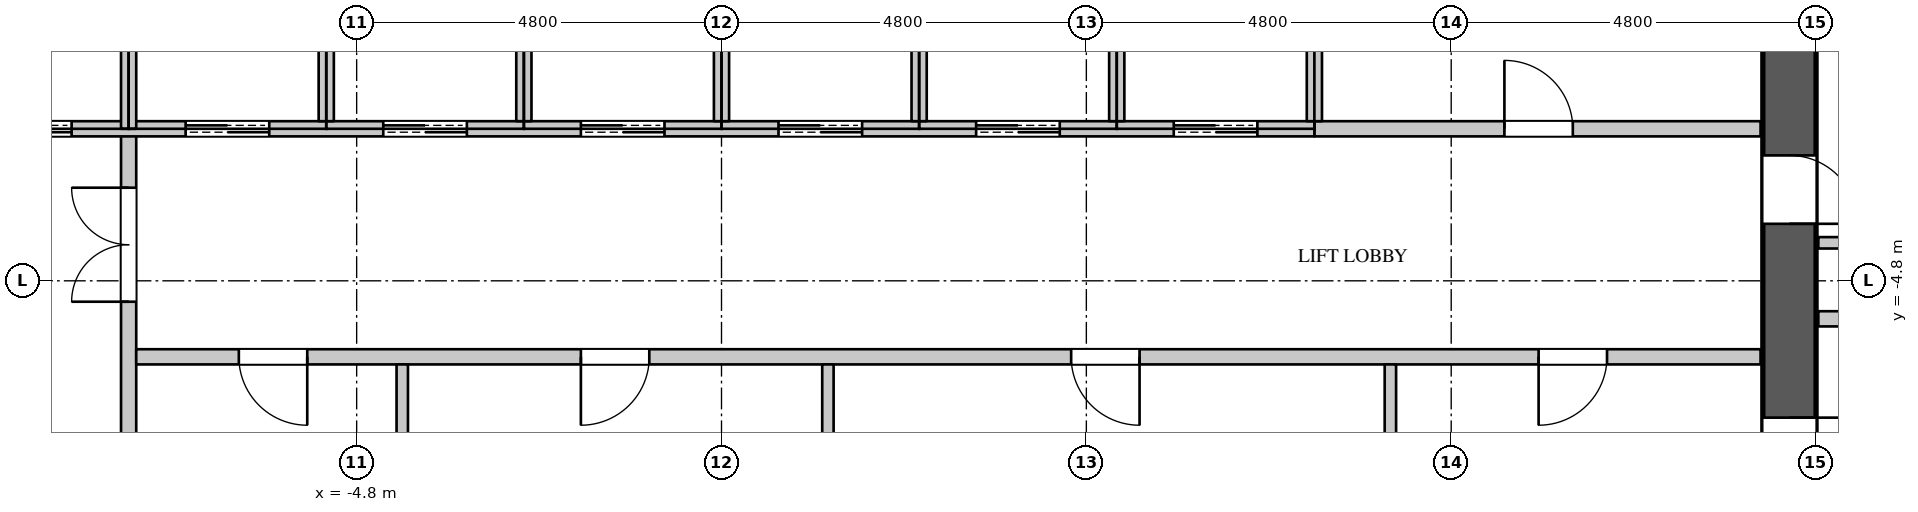
"""IFC4 building model, lengths in metres.
Left out: names, types, materials, properties, quantities, classifications, styles, units other than length and angle.
Written with IfcOpenShell. Run it as: python <this file> out.ifc"""

import sys

from ifc_helpers import new_model, si_unit, direction, frame, frame_2d, origin, place, context, subcontext, project, spatial, rectangle, extrude, element, fill, save


model = new_model("IFC4")
c1 = context("Model", 3, precision=1e-05, world=origin(), true_north=direction((0.0, 1.0)))
c2 = subcontext(c1, "Body", "Model", "MODEL_VIEW")
j1 = project(units=[si_unit("LENGTHUNIT", "METRE"), si_unit("PLANEANGLEUNIT", "RADIAN")], contexts=[c1])
p1 = place(None, origin())
s1 = spatial("IfcSite", under=j1, at=p1, CompositionType="ELEMENT")
p2 = place(p1, origin())
s2 = spatial("IfcBuilding", under=s1, at=p2, CompositionType="ELEMENT")
p3 = place(p2, frame((0.0, 0.0, 208.5)))
s3 = spatial("IfcBuildingStorey", under=s2, at=p3, CompositionType="ELEMENT", Elevation=208.5)
p4 = place(p3, frame((14.05, -11.3, 0.0), z_axis=(0.0, 0.0, 1.0), x_axis=(0.0, 1.0, 0.0)))
e1 = element("IfcWall", 1, at=p4, inside=s3, PredefinedType="SHEAR", context=c2, shape_type="SweptSolid", body=[
    extrude(rectangle(XDim=22.6, YDim=0.7, at=frame_2d((11.3, 0.0))), origin(), (0.0, 0.0, 1.0), 5.4),
])
p5 = place(p4, frame((20.5, 0.0, 0.0)))
e2 = element("IfcOpeningElement", 2, at=p5, cuts=e1, PredefinedType="OPENING", context=c2, shape_type="SweptSolid", body=[
    extrude(rectangle(XDim=1.1, YDim=2.2, at=frame_2d((0.55, 1.1))), frame((0.0, 0.36, 0.0), z_axis=(0.0, -1.0, 0.0), x_axis=(1.0, 0.0, 0.0)), (0.0, 0.0, 1.0), 0.72),
])
p6 = place(p4, frame((7.25, 0.0, 0.0)))
e3 = element("IfcOpeningElement", 3, at=p6, cuts=e1, PredefinedType="OPENING", context=c2, shape_type="SweptSolid", body=[
    extrude(rectangle(XDim=0.9, YDim=2.2, at=frame_2d((0.45, 1.1))), frame((0.0, 0.36, 0.0), z_axis=(0.0, -1.0, 0.0), x_axis=(1.0, 0.0, 0.0)), (0.0, 0.0, 1.0), 0.72),
])
p7 = place(p4, frame((1.0, 0.0, 0.0)))
e4 = element("IfcOpeningElement", 4, at=p7, cuts=e1, PredefinedType="OPENING", context=c2, shape_type="SweptSolid", body=[
    extrude(rectangle(XDim=1.1, YDim=2.2, at=frame_2d((0.55, 1.1))), frame((0.0, 0.36, 0.0), z_axis=(0.0, -1.0, 0.0), x_axis=(1.0, 0.0, 0.0)), (0.0, 0.0, 1.0), 0.72),
])
p8 = place(p4, frame((3.8, 0.0, 0.0)))
e5 = element("IfcOpeningElement", 5, at=p8, cuts=e1, PredefinedType="OPENING", context=c2, shape_type="SweptSolid", body=[
    extrude(rectangle(XDim=0.9, YDim=2.2, at=frame_2d((0.45, 1.1))), frame((0.0, 0.36, 0.0), z_axis=(0.0, -1.0, 0.0), x_axis=(1.0, 0.0, 0.0)), (0.0, 0.0, 1.0), 0.72),
])
p9 = place(p3, frame((-7.8, -8.075, 0.0), z_axis=(0.0, 0.0, 1.0), x_axis=(0.0, 1.0, 0.0)))
e6 = element("IfcWall", 6, at=p9, inside=s3, PredefinedType="PARTITIONING", context=c2, shape_type="SweptSolid", body=[
    extrude(rectangle(XDim=5.275, YDim=0.2, at=frame_2d((2.637, 0.0))), origin(), (0.0, 0.0, 1.0), 5.15),
])
p10 = place(p9, frame((3.0, 0.0, 0.0)))
e7 = element("IfcOpeningElement", 7, at=p10, cuts=e6, PredefinedType="OPENING", context=c2, shape_type="SweptSolid", body=[
    extrude(rectangle(XDim=1.5, YDim=2.4, at=frame_2d((0.75, 1.2))), frame((0.0, 0.11, 0.0), z_axis=(0.0, -1.0, 0.0), x_axis=(1.0, 0.0, 0.0)), (0.0, 0.0, 1.0), 0.22),
])
p11 = place(p3, frame((-7.7, -5.8, 0.0), z_axis=(0.0, 0.0, 1.0), x_axis=(1.0, 0.0, 0.0)))
e8 = element("IfcWall", 8, at=p11, inside=s3, PredefinedType="PARTITIONING", context=c2, shape_type="SweptSolid", body=[
    extrude(rectangle(XDim=21.37, YDim=0.2, at=frame_2d((10.685, 0.0))), origin(), (0.0, 0.0, 1.0), 5.15),
])
p12 = place(p11, frame((1.35, 0.0, 0.0)))
e9 = element("IfcOpeningElement", 9, at=p12, cuts=e8, PredefinedType="OPENING", context=c2, shape_type="SweptSolid", body=[
    extrude(rectangle(XDim=0.9, YDim=2.2, at=frame_2d((0.45, 1.1))), frame((0.0, 0.11, 0.0), z_axis=(0.0, -1.0, 0.0), x_axis=(1.0, 0.0, 0.0)), (0.0, 0.0, 1.0), 0.22),
])
p13 = place(p11, frame((5.85, 0.0, 0.0)))
e10 = element("IfcOpeningElement", 10, at=p13, cuts=e8, PredefinedType="OPENING", context=c2, shape_type="SweptSolid", body=[
    extrude(rectangle(XDim=0.9, YDim=2.2, at=frame_2d((0.45, 1.1))), frame((0.0, 0.11, 0.0), z_axis=(0.0, -1.0, 0.0), x_axis=(1.0, 0.0, 0.0)), (0.0, 0.0, 1.0), 0.22),
])
p14 = place(p11, frame((12.3, 0.0, 0.0)))
e11 = element("IfcOpeningElement", 11, at=p14, cuts=e8, PredefinedType="OPENING", context=c2, shape_type="SweptSolid", body=[
    extrude(rectangle(XDim=0.9, YDim=2.2, at=frame_2d((0.45, 1.1))), frame((0.0, 0.11, 0.0), z_axis=(0.0, -1.0, 0.0), x_axis=(1.0, 0.0, 0.0)), (0.0, 0.0, 1.0), 0.22),
])
p15 = place(p11, frame((18.45, 0.0, 0.0)))
e12 = element("IfcOpeningElement", 12, at=p15, cuts=e8, PredefinedType="OPENING", context=c2, shape_type="SweptSolid", body=[
    extrude(rectangle(XDim=0.9, YDim=2.2, at=frame_2d((0.45, 1.1))), frame((0.0, 0.11, 0.0), z_axis=(0.0, -1.0, 0.0), x_axis=(1.0, 0.0, 0.0)), (0.0, 0.0, 1.0), 0.22),
])
for number, where, z_axis, x_axis in (
    (13, (-4.2, -11.27, 0.0), (0.0, 0.0, 1.0), (0.0, 1.0, 0.0)),
    (14, (1.4, -11.27, 0.0), (0.0, 0.0, 1.0), (0.0, 1.0, 0.0)),
):
    element("IfcWall", number, at=place(p3, frame(where, z_axis=z_axis, x_axis=x_axis)), inside=s3, PredefinedType="PARTITIONING", context=c2, shape_type="SweptSolid", body=[
        extrude(rectangle(XDim=5.37, YDim=0.15, at=frame_2d((2.685, 0.0))), origin(), (0.0, 0.0, 1.0), 5.15),
    ])
p16 = place(p3, frame((8.8, -8.075, 0.0), z_axis=(0.0, 0.0, 1.0), x_axis=(0.0, 1.0, 0.0)))
e15 = element("IfcWall", 15, at=p16, inside=s3, PredefinedType="PARTITIONING", context=c2, shape_type="SweptSolid", body=[
    extrude(rectangle(XDim=2.175, YDim=0.15, at=frame_2d((1.087, 0.0))), origin(), (0.0, 0.0, 1.0), 5.15),
])
p17 = place(p3, frame((14.43, -4.3, 0.0), z_axis=(0.0, 0.0, 1.0), x_axis=(1.0, 0.0, 0.0)))
e16 = element("IfcWall", 16, at=p17, inside=s3, PredefinedType="PARTITIONING", context=c2, shape_type="SweptSolid", body=[
    extrude(rectangle(XDim=5.629, YDim=0.15, at=frame_2d((2.814, 0.0))), origin(), (0.0, 0.0, 1.0), 5.15),
])
p18 = place(p3, frame((7.8, -2.8, 0.0), z_axis=(0.0, 0.0, 1.0), x_axis=(1.0, 0.0, 0.0)))
e17 = element("IfcWall", 17, at=p18, inside=s3, PredefinedType="PARTITIONING", context=c2, shape_type="SweptSolid", body=[
    extrude(rectangle(XDim=5.87, YDim=0.2, at=frame_2d((2.935, 0.0))), origin(), (0.0, 0.0, 1.0), 5.15),
])
p19 = place(p18, frame((2.5, 0.0, 0.0)))
e18 = element("IfcOpeningElement", 18, at=p19, cuts=e17, PredefinedType="OPENING", context=c2, shape_type="SweptSolid", body=[
    extrude(rectangle(XDim=0.9, YDim=2.2, at=frame_2d((0.45, 1.1))), frame((0.0, 0.11, 0.0), z_axis=(0.0, -1.0, 0.0), x_axis=(1.0, 0.0, 0.0)), (0.0, 0.0, 1.0), 0.22),
])
p20 = place(p3, frame((14.43, -5.3, 0.0), z_axis=(0.0, 0.0, 1.0), x_axis=(1.0, 0.0, 0.0)))
e19 = element("IfcWall", 19, at=p20, inside=s3, PredefinedType="PARTITIONING", context=c2, shape_type="SweptSolid", body=[
    extrude(rectangle(XDim=9.625, YDim=0.2, at=frame_2d((4.812, 0.0))), origin(), (0.0, 0.0, 1.0), 5.15),
])
p21 = place(p3, frame((-10.4, -2.8, 0.0), z_axis=(0.0, 0.0, 1.0), x_axis=(1.0, 0.0, 0.0)))
e20 = element("IfcWall", 20, at=p21, inside=s3, PredefinedType="PARTITIONING", context=c2, shape_type="SweptSolid", body=[
    extrude(rectangle(XDim=18.2, YDim=0.2, at=frame_2d((9.1, 0.0))), origin(), (0.0, 0.0, 1.0), 5.15),
])
p22 = place(p21, frame((0.75, 0.0, 0.0)))
e21 = element("IfcOpeningElement", 21, at=p22, cuts=e20, PredefinedType="OPENING", context=c2, shape_type="SweptSolid", body=[
    extrude(rectangle(XDim=1.1, YDim=2.2, at=frame_2d((0.55, 1.1))), frame((0.0, 0.11, 0.0), z_axis=(0.0, -1.0, 0.0), x_axis=(1.0, 0.0, 0.0)), (0.0, 0.0, 1.0), 0.22),
])
p23 = place(p21, frame((3.35, 0.0, 0.0)))
e22 = element("IfcOpeningElement", 22, at=p23, cuts=e20, PredefinedType="OPENING", context=c2, shape_type="SweptSolid", body=[
    extrude(rectangle(XDim=1.1, YDim=2.2, at=frame_2d((0.55, 1.1))), frame((0.0, 0.11, 0.0), z_axis=(0.0, -1.0, 0.0), x_axis=(1.0, 0.0, 0.0)), (0.0, 0.0, 1.0), 0.22),
])
p24 = place(p21, frame((5.95, 0.0, 0.0)))
e23 = element("IfcOpeningElement", 23, at=p24, cuts=e20, PredefinedType="OPENING", context=c2, shape_type="SweptSolid", body=[
    extrude(rectangle(XDim=1.1, YDim=2.2, at=frame_2d((0.55, 1.1))), frame((0.0, 0.11, 0.0), z_axis=(0.0, -1.0, 0.0), x_axis=(1.0, 0.0, 0.0)), (0.0, 0.0, 1.0), 0.22),
])
p25 = place(p21, frame((8.55, 0.0, 0.0)))
e24 = element("IfcOpeningElement", 24, at=p25, cuts=e20, PredefinedType="OPENING", context=c2, shape_type="SweptSolid", body=[
    extrude(rectangle(XDim=1.1, YDim=2.2, at=frame_2d((0.55, 1.1))), frame((0.0, 0.11, 0.0), z_axis=(0.0, -1.0, 0.0), x_axis=(1.0, 0.0, 0.0)), (0.0, 0.0, 1.0), 0.22),
])
p26 = place(p21, frame((11.15, 0.0, 0.0)))
e25 = element("IfcOpeningElement", 25, at=p26, cuts=e20, PredefinedType="OPENING", context=c2, shape_type="SweptSolid", body=[
    extrude(rectangle(XDim=1.1, YDim=2.2, at=frame_2d((0.55, 1.1))), frame((0.0, 0.11, 0.0), z_axis=(0.0, -1.0, 0.0), x_axis=(1.0, 0.0, 0.0)), (0.0, 0.0, 1.0), 0.22),
])
p27 = place(p21, frame((13.75, 0.0, 0.0)))
e26 = element("IfcOpeningElement", 26, at=p27, cuts=e20, PredefinedType="OPENING", context=c2, shape_type="SweptSolid", body=[
    extrude(rectangle(XDim=1.1, YDim=2.2, at=frame_2d((0.55, 1.1))), frame((0.0, 0.11, 0.0), z_axis=(0.0, -1.0, 0.0), x_axis=(1.0, 0.0, 0.0)), (0.0, 0.0, 1.0), 0.22),
])
p28 = place(p21, frame((16.35, 0.0, 0.0)))
e27 = element("IfcOpeningElement", 27, at=p28, cuts=e20, PredefinedType="OPENING", context=c2, shape_type="SweptSolid", body=[
    extrude(rectangle(XDim=1.1, YDim=2.2, at=frame_2d((0.55, 1.1))), frame((0.0, 0.11, 0.0), z_axis=(0.0, -1.0, 0.0), x_axis=(1.0, 0.0, 0.0)), (0.0, 0.0, 1.0), 0.22),
])
p29 = place(p3, frame((-7.8, -2.8, 0.0), z_axis=(0.0, 0.0, 1.0), x_axis=(0.0, 1.0, 0.0)))
e28 = element("IfcWall", 28, at=p29, inside=s3, PredefinedType="PARTITIONING", context=c2, shape_type="SweptSolid", body=[
    extrude(rectangle(XDim=2.8, YDim=0.2, at=frame_2d((1.4, 0.0))), origin(), (0.0, 0.0, 1.0), 5.15),
])
for number, where, z_axis, x_axis in (
    (29, (-5.2, -2.7, 0.0), (0.0, 0.0, 1.0), (0.0, 1.0, 0.0)),
    (30, (-2.6, -2.7, 0.0), (0.0, 0.0, 1.0), (0.0, 1.0, 0.0)),
    (31, (0.0, -2.7, 0.0), (0.0, 0.0, 1.0), (0.0, 1.0, 0.0)),
    (32, (2.6, -2.7, 0.0), (0.0, 0.0, 1.0), (0.0, 1.0, 0.0)),
    (33, (5.2, -2.7, 0.0), (0.0, 0.0, 1.0), (0.0, 1.0, 0.0)),
    (34, (7.8, -2.7, 0.0), (0.0, 0.0, 1.0), (0.0, 1.0, 0.0)),
):
    element("IfcWall", number, at=place(p3, frame(where, z_axis=z_axis, x_axis=x_axis)), inside=s3, PredefinedType="PARTITIONING", context=c2, shape_type="SweptSolid", body=[
        extrude(rectangle(XDim=2.6, YDim=0.2, at=frame_2d((1.3, 0.0))), origin(), (0.0, 0.0, 1.0), 5.15),
    ])
p30 = place(p19, origin())
e35 = element("IfcDoor", 35, at=p30, inside=s3, OperationType="SINGLE_SWING_LEFT", PredefinedType="DOOR", context=c2, shape_type="SweptSolid", body=[
    extrude(rectangle(XDim=0.9, YDim=2.2, at=frame_2d((0.45, 1.1))), frame((0.0, 0.025, 0.0), z_axis=(0.0, -1.0, 0.0), x_axis=(1.0, 0.0, 0.0)), (0.0, 0.0, 1.0), 0.05),
])
fill(e18, e35)
p31 = place(p12, origin())
e36 = element("IfcDoor", 36, at=p31, inside=s3, OperationType="SINGLE_SWING_LEFT", PredefinedType="DOOR", context=c2, shape_type="SweptSolid", body=[
    extrude(rectangle(XDim=0.9, YDim=2.2, at=frame_2d((0.45, 1.1))), frame((0.0, 0.025, 0.0), z_axis=(0.0, -1.0, 0.0), x_axis=(1.0, 0.0, 0.0)), (0.0, 0.0, 1.0), 0.05),
])
fill(e9, e36)
p32 = place(p13, origin())
e37 = element("IfcDoor", 37, at=p32, inside=s3, OperationType="SINGLE_SWING_RIGHT", PredefinedType="DOOR", context=c2, shape_type="SweptSolid", body=[
    extrude(rectangle(XDim=0.9, YDim=2.2, at=frame_2d((0.45, 1.1))), frame((0.0, 0.025, 0.0), z_axis=(0.0, -1.0, 0.0), x_axis=(1.0, 0.0, 0.0)), (0.0, 0.0, 1.0), 0.05),
])
fill(e10, e37)
p33 = place(p14, origin())
e38 = element("IfcDoor", 38, at=p33, inside=s3, OperationType="SINGLE_SWING_LEFT", PredefinedType="DOOR", context=c2, shape_type="SweptSolid", body=[
    extrude(rectangle(XDim=0.9, YDim=2.2, at=frame_2d((0.45, 1.1))), frame((0.0, 0.025, 0.0), z_axis=(0.0, -1.0, 0.0), x_axis=(1.0, 0.0, 0.0)), (0.0, 0.0, 1.0), 0.05),
])
fill(e11, e38)
p34 = place(p15, origin())
e39 = element("IfcDoor", 39, at=p34, inside=s3, OperationType="SINGLE_SWING_RIGHT", PredefinedType="DOOR", context=c2, shape_type="SweptSolid", body=[
    extrude(rectangle(XDim=0.9, YDim=2.2, at=frame_2d((0.45, 1.1))), frame((0.0, 0.025, 0.0), z_axis=(0.0, -1.0, 0.0), x_axis=(1.0, 0.0, 0.0)), (0.0, 0.0, 1.0), 0.05),
])
fill(e12, e39)
p35 = place(p22, origin())
e40 = element("IfcDoor", 40, at=p35, inside=s3, OperationType="DOUBLE_DOOR_SLIDING", PredefinedType="DOOR", context=c2, shape_type="SweptSolid", body=[
    extrude(rectangle(XDim=1.1, YDim=2.2, at=frame_2d((0.55, 1.1))), frame((0.0, 0.025, 0.0), z_axis=(0.0, -1.0, 0.0), x_axis=(1.0, 0.0, 0.0)), (0.0, 0.0, 1.0), 0.05),
])
fill(e21, e40)
p36 = place(p23, origin())
e41 = element("IfcDoor", 41, at=p36, inside=s3, OperationType="DOUBLE_DOOR_SLIDING", PredefinedType="DOOR", context=c2, shape_type="SweptSolid", body=[
    extrude(rectangle(XDim=1.1, YDim=2.2, at=frame_2d((0.55, 1.1))), frame((0.0, 0.025, 0.0), z_axis=(0.0, -1.0, 0.0), x_axis=(1.0, 0.0, 0.0)), (0.0, 0.0, 1.0), 0.05),
])
fill(e22, e41)
p37 = place(p24, origin())
e42 = element("IfcDoor", 42, at=p37, inside=s3, OperationType="DOUBLE_DOOR_SLIDING", PredefinedType="DOOR", context=c2, shape_type="SweptSolid", body=[
    extrude(rectangle(XDim=1.1, YDim=2.2, at=frame_2d((0.55, 1.1))), frame((0.0, 0.025, 0.0), z_axis=(0.0, -1.0, 0.0), x_axis=(1.0, 0.0, 0.0)), (0.0, 0.0, 1.0), 0.05),
])
fill(e23, e42)
p38 = place(p25, origin())
e43 = element("IfcDoor", 43, at=p38, inside=s3, OperationType="DOUBLE_DOOR_SLIDING", PredefinedType="DOOR", context=c2, shape_type="SweptSolid", body=[
    extrude(rectangle(XDim=1.1, YDim=2.2, at=frame_2d((0.55, 1.1))), frame((0.0, 0.025, 0.0), z_axis=(0.0, -1.0, 0.0), x_axis=(1.0, 0.0, 0.0)), (0.0, 0.0, 1.0), 0.05),
])
fill(e24, e43)
p39 = place(p26, origin())
e44 = element("IfcDoor", 44, at=p39, inside=s3, OperationType="DOUBLE_DOOR_SLIDING", PredefinedType="DOOR", context=c2, shape_type="SweptSolid", body=[
    extrude(rectangle(XDim=1.1, YDim=2.2, at=frame_2d((0.55, 1.1))), frame((0.0, 0.025, 0.0), z_axis=(0.0, -1.0, 0.0), x_axis=(1.0, 0.0, 0.0)), (0.0, 0.0, 1.0), 0.05),
])
fill(e25, e44)
p40 = place(p27, origin())
e45 = element("IfcDoor", 45, at=p40, inside=s3, OperationType="DOUBLE_DOOR_SLIDING", PredefinedType="DOOR", context=c2, shape_type="SweptSolid", body=[
    extrude(rectangle(XDim=1.1, YDim=2.2, at=frame_2d((0.55, 1.1))), frame((0.0, 0.025, 0.0), z_axis=(0.0, -1.0, 0.0), x_axis=(1.0, 0.0, 0.0)), (0.0, 0.0, 1.0), 0.05),
])
fill(e26, e45)
p41 = place(p28, origin())
e46 = element("IfcDoor", 46, at=p41, inside=s3, OperationType="DOUBLE_DOOR_SLIDING", PredefinedType="DOOR", context=c2, shape_type="SweptSolid", body=[
    extrude(rectangle(XDim=1.1, YDim=2.2, at=frame_2d((0.55, 1.1))), frame((0.0, 0.025, 0.0), z_axis=(0.0, -1.0, 0.0), x_axis=(1.0, 0.0, 0.0)), (0.0, 0.0, 1.0), 0.05),
])
fill(e27, e46)
p42 = place(p10, origin())
e47 = element("IfcDoor", 47, at=p42, inside=s3, OperationType="DOUBLE_DOOR_SINGLE_SWING", PredefinedType="DOOR", context=c2, shape_type="SweptSolid", body=[
    extrude(rectangle(XDim=1.5, YDim=2.4, at=frame_2d((0.75, 1.2))), frame((0.0, 0.025, 0.0), z_axis=(0.0, -1.0, 0.0), x_axis=(1.0, 0.0, 0.0)), (0.0, 0.0, 1.0), 0.05),
])
fill(e7, e47)
p43 = place(p6, origin())
e48 = element("IfcDoor", 48, at=p43, inside=s3, OperationType="SINGLE_SWING_RIGHT", PredefinedType="DOOR", context=c2, shape_type="SweptSolid", body=[
    extrude(rectangle(XDim=0.9, YDim=2.2, at=frame_2d((0.45, 1.1))), frame((0.0, -0.295, 0.0), z_axis=(0.0, -1.0, 0.0), x_axis=(1.0, 0.0, 0.0)), (0.0, 0.0, 1.0), 0.05),
])
fill(e3, e48)
p44 = place(p8, origin())
e49 = element("IfcDoor", 49, at=p44, inside=s3, OperationType="SINGLE_SWING_LEFT", PredefinedType="DOOR", context=c2, shape_type="SweptSolid", body=[
    extrude(rectangle(XDim=0.9, YDim=2.2, at=frame_2d((0.45, 1.1))), frame((0.0, -0.295, 0.0), z_axis=(0.0, -1.0, 0.0), x_axis=(1.0, 0.0, 0.0)), (0.0, 0.0, 1.0), 0.05),
])
fill(e5, e49)
save(model, sys.argv[1])
